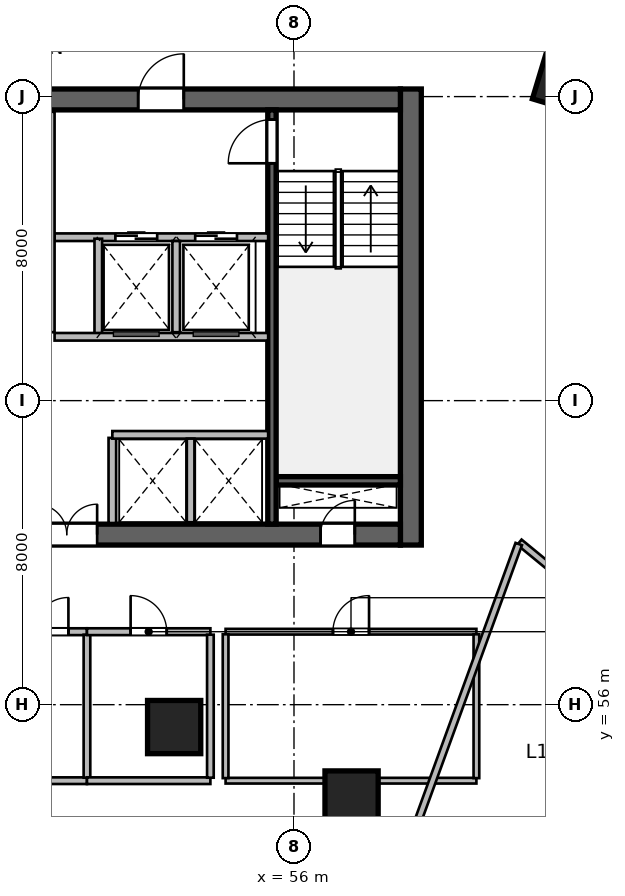
"""IFC4 building model, lengths in metres.
Left out: names, types, materials, properties, quantities, classifications, styles, units other than length and angle.
Written with IfcOpenShell. Run it as: python <this file> out.ifc"""

import sys

from ifc_helpers import new_model, si_unit, direction, frame, frame_2d, origin, origin_2d, place, context, subcontext, project, spatial, rectangle, circle, extrude, source, transform, mapped, element, fill, save


model = new_model("IFC4")
c1 = context("Model", 3, precision=1e-05, world=origin(), true_north=direction((0.0, 1.0)))
c2 = subcontext(c1, "Body", "Model", "MODEL_VIEW")
j1 = project(units=[si_unit("LENGTHUNIT", "METRE"), si_unit("PLANEANGLEUNIT", "RADIAN")], contexts=[c1])
p1 = place(None, origin())
s1 = spatial("IfcSite", under=j1, at=p1, CompositionType="ELEMENT")
p2 = place(p1, origin())
s2 = spatial("IfcBuilding", under=s1, at=p2, CompositionType="ELEMENT")
p3 = place(p2, frame((0.0, 0.0, 57.0)))
s3 = spatial("IfcBuildingStorey", under=s2, at=p3, CompositionType="ELEMENT", Elevation=57.0)
m1 = source(origin(), c2, "Body", "SweptSolid", [
    extrude(rectangle(XDim=12.0, YDim=0.55, at=frame_2d((6.0, 0.0))), origin(), (0.0, 0.0, 1.0), 3.6),
])
p4 = place(p3, frame((59.075, 60.2, 0.0), z_axis=(0.0, 0.0, 1.0), x_axis=(0.0, 1.0, 0.0)))
e1 = element("IfcWall", 1, at=p4, inside=s3, PredefinedType="SHEAR", context=c2, shape_type="MappedRepresentation", body=[
    mapped(m1, transform((0.0, 0.0, 0.0), scale=1.0)),
])
m2 = source(origin(), c2, "Body", "SweptSolid", [
    extrude(rectangle(XDim=21.6, YDim=0.55, at=frame_2d((10.8, 0.0))), origin(), (0.0, 0.0, 1.0), 3.6),
])
p5 = place(p3, frame((37.2, 60.475, 0.0), z_axis=(0.0, 0.0, 1.0), x_axis=(1.0, 0.0, 0.0)))
e2 = element("IfcWall", 2, at=p5, inside=s3, PredefinedType="SHEAR", context=c2, shape_type="MappedRepresentation", body=[
    mapped(m2, transform((0.0, 0.0, 0.0), scale=1.0)),
])
p6 = place(p5, frame((1.1, 0.0, 0.0)))
e3 = element("IfcOpeningElement", 3, at=p6, cuts=e2, PredefinedType="OPENING", context=c2, shape_type="SweptSolid", body=[
    extrude(rectangle(XDim=1.15, YDim=2.15, at=frame_2d((0.575, 1.075))), frame((0.0, 0.285, 0.0), z_axis=(0.0, -1.0, 0.0), x_axis=(1.0, 0.0, 0.0)), (0.0, 0.0, 1.0), 0.57),
])
p7 = place(p5, frame((19.5, 0.0, 0.0)))
e4 = element("IfcOpeningElement", 4, at=p7, cuts=e2, PredefinedType="OPENING", context=c2, shape_type="SweptSolid", body=[
    extrude(rectangle(XDim=0.9, YDim=2.1, at=frame_2d((0.45, 1.05))), frame((0.0, 0.285, 0.0), z_axis=(0.0, -1.0, 0.0), x_axis=(1.0, 0.0, 0.0)), (0.0, 0.0, 1.0), 0.57),
])
p8 = place(p5, frame((12.02, 0.0, 0.0)))
e5 = element("IfcOpeningElement", 5, at=p8, cuts=e2, PredefinedType="OPENING", context=c2, shape_type="SweptSolid", body=[
    extrude(rectangle(XDim=1.6, YDim=2.15, at=frame_2d((0.8, 1.075))), frame((0.0, 0.285, 0.0), z_axis=(0.0, -1.0, 0.0), x_axis=(1.0, 0.0, 0.0)), (0.0, 0.0, 1.0), 0.57),
])
p9 = place(p3, frame((37.2, 71.925, 0.0), z_axis=(0.0, 0.0, 1.0), x_axis=(1.0, 0.0, 0.0)))
e6 = element("IfcWall", 6, at=p9, inside=s3, PredefinedType="SHEAR", context=c2, shape_type="MappedRepresentation", body=[
    mapped(m2, transform((0.0, 0.0, 0.0), scale=1.0)),
])
p10 = place(p9, frame((1.2, 0.0, 0.0)))
e7 = element("IfcOpeningElement", 7, at=p10, cuts=e6, PredefinedType="OPENING", context=c2, shape_type="SweptSolid", body=[
    extrude(rectangle(XDim=0.9, YDim=2.1, at=frame_2d((0.45, 1.05))), frame((0.0, 0.285, 0.0), z_axis=(0.0, -1.0, 0.0), x_axis=(1.0, 0.0, 0.0)), (0.0, 0.0, 1.0), 0.57),
])
p11 = place(p9, frame((14.7, 0.0, 0.0)))
e8 = element("IfcOpeningElement", 8, at=p11, cuts=e6, PredefinedType="OPENING", context=c2, shape_type="SweptSolid", body=[
    extrude(rectangle(XDim=1.2, YDim=2.15, at=frame_2d((0.6, 1.075))), frame((0.0, 0.285, 0.0), z_axis=(0.0, -1.0, 0.0), x_axis=(1.0, 0.0, 0.0)), (0.0, 0.0, 1.0), 0.57),
])
p12 = place(p9, frame((4.15, 0.0, 0.0)))
e9 = element("IfcOpeningElement", 9, at=p12, cuts=e6, PredefinedType="OPENING", context=c2, shape_type="SweptSolid", body=[
    extrude(rectangle(XDim=1.3, YDim=2.15, at=frame_2d((0.65, 1.075))), frame((0.0, 0.285, 0.0), z_axis=(0.0, -1.0, 0.0), x_axis=(1.0, 0.0, 0.0)), (0.0, 0.0, 1.0), 0.57),
])
p13 = place(p9, frame((7.25, 0.0, 0.0)))
e10 = element("IfcOpeningElement", 10, at=p13, cuts=e6, PredefinedType="OPENING", context=c2, shape_type="SweptSolid", body=[
    extrude(rectangle(XDim=0.9, YDim=2.1, at=frame_2d((0.45, 1.05))), frame((0.0, 0.285, 0.0), z_axis=(0.0, -1.0, 0.0), x_axis=(1.0, 0.0, 0.0)), (0.0, 0.0, 1.0), 0.57),
])
m3 = source(origin(), c2, "Body", "SweptSolid", [
    extrude(rectangle(XDim=3.27, YDim=0.22, at=frame_2d((1.635, 0.0))), origin(), (0.0, 0.0, 1.0), 3.6),
])
p14 = place(p3, frame((55.53, 61.89, 0.0), z_axis=(0.0, 0.0, 1.0), x_axis=(1.0, 0.0, 0.0)))
e11 = element("IfcWall", 11, at=p14, inside=s3, PredefinedType="SHEAR", context=c2, shape_type="MappedRepresentation", body=[
    mapped(m3, transform((0.0, 0.0, 0.0), scale=1.0)),
])
m4 = source(origin(), c2, "Body", "SweptSolid", [
    extrude(rectangle(XDim=10.9, YDim=0.22, at=frame_2d((5.45, 0.0))), origin(), (0.0, 0.0, 1.0), 3.6),
])
p15 = place(p3, frame((55.42, 60.75, 0.0), z_axis=(0.0, 0.0, 1.0), x_axis=(0.0, 1.0, 0.0)))
e12 = element("IfcWall", 12, at=p15, inside=s3, PredefinedType="SHEAR", context=c2, shape_type="MappedRepresentation", body=[
    mapped(m4, transform((0.0, 0.0, 0.0), scale=1.0)),
])
p16 = place(p15, frame((9.495, 0.0, 0.0)))
e13 = element("IfcOpeningElement", 13, at=p16, cuts=e12, PredefinedType="OPENING", context=c2, shape_type="SweptSolid", body=[
    extrude(rectangle(XDim=1.15, YDim=2.15, at=frame_2d((0.575, 1.075))), frame((0.0, 0.12, 0.0), z_axis=(0.0, -1.0, 0.0), x_axis=(1.0, 0.0, 0.0)), (0.0, 0.0, 1.0), 0.24),
])
m5 = source(origin(), c2, "Body", "SweptSolid", [
    extrude(circle(Radius=0.7, at=origin_2d()), origin(), (0.0, 0.0, 1.0), 3.6),
])
for number, where, z_axis, x_axis in (
    (14, (52.846, 55.411, 0.0), (0.0, 0.0, 1.0), (0.143, 0.99, 0.0)),
    (15, (57.515, 53.558, 0.0), (0.0, 0.0, 1.0), (0.289, 0.957, 0.0)),
):
    element("IfcColumn", number, at=place(p3, frame(where, z_axis=z_axis, x_axis=x_axis)), inside=s3, PredefinedType="COLUMN", context=c2, shape_type="MappedRepresentation", body=[
        mapped(m5, transform((0.0, 0.0, 0.0), scale=1.0)),
    ])
m6 = source(origin(), c2, "Body", "SweptSolid", [
    extrude(rectangle(XDim=1.5, YDim=1.5, at=origin_2d()), origin(), (0.0, 0.0, 1.0), 3.6),
])
p17 = place(p3, frame((63.209, 72.442, 0.0), z_axis=(0.0, 0.0, 1.0), x_axis=(0.288697611798, 0.957420330337, 0.0)))
e16 = element("IfcColumn", 16, at=p17, inside=s3, PredefinedType="COLUMN", context=c2, shape_type="MappedRepresentation", body=[
    mapped(m6, transform((0.0, 0.0, 0.0), scale=1.0)),
])
m7 = source(origin(), c2, "Body", "SweptSolid", [
    extrude(rectangle(XDim=2.24, YDim=0.2, at=frame_2d((1.12, 0.0))), origin(), (0.0, 0.0, 1.0), 3.36),
])
p18 = place(p3, frame((51.22, 60.78, 0.0), z_axis=(0.0, 0.0, 1.0), x_axis=(0.0, 1.0, 0.0)))
e17 = element("IfcWall", 17, at=p18, inside=s3, PredefinedType="SOLIDWALL", context=c2, shape_type="MappedRepresentation", body=[
    mapped(m7, transform((0.0, 0.0, 0.0), scale=1.0)),
])
m8 = source(origin(), c2, "Body", "SweptSolid", [
    extrude(rectangle(XDim=5.62, YDim=0.2, at=frame_2d((2.81, 0.0))), origin(), (0.0, 0.0, 1.0), 3.36),
])
p19 = place(p3, frame((49.7, 68.3, 0.0), z_axis=(0.0, 0.0, 1.0), x_axis=(1.0, 0.0, 0.0)))
e18 = element("IfcWall", 18, at=p19, inside=s3, PredefinedType="SOLIDWALL", context=c2, shape_type="MappedRepresentation", body=[
    mapped(m8, transform((0.0, 0.0, 0.0), scale=1.0)),
])
p20 = place(p19, frame((1.6, 0.0, 0.0)))
e19 = element("IfcOpeningElement", 19, at=p20, cuts=e18, PredefinedType="OPENING", context=c2, shape_type="SweptSolid", body=[
    extrude(rectangle(XDim=1.1, YDim=2.15, at=frame_2d((0.55, 1.075))), frame((0.0, 0.11, 0.0), z_axis=(0.0, -1.0, 0.0), x_axis=(1.0, 0.0, 0.0)), (0.0, 0.0, 1.0), 0.22),
])
p21 = place(p19, frame((3.7, 0.0, 0.0)))
e20 = element("IfcOpeningElement", 20, at=p21, cuts=e18, PredefinedType="OPENING", context=c2, shape_type="SweptSolid", body=[
    extrude(rectangle(XDim=1.1, YDim=2.15, at=frame_2d((0.55, 1.075))), frame((0.0, 0.11, 0.0), z_axis=(0.0, -1.0, 0.0), x_axis=(1.0, 0.0, 0.0)), (0.0, 0.0, 1.0), 0.22),
])
m9 = source(origin(), c2, "Body", "SweptSolid", [
    extrude(rectangle(XDim=5.8, YDim=0.2, at=frame_2d((2.9, 0.0))), origin(), (0.0, 0.0, 1.0), 3.36),
])
p22 = place(p3, frame((49.6, 65.8, 0.0), z_axis=(0.0, 0.0, 1.0), x_axis=(0.0, 1.0, 0.0)))
e21 = element("IfcWall", 21, at=p22, inside=s3, PredefinedType="SOLIDWALL", context=c2, shape_type="MappedRepresentation", body=[
    mapped(m9, transform((0.0, 0.0, 0.0), scale=1.0)),
])
m10 = source(origin(), c2, "Body", "SweptSolid", [
    extrude(rectangle(XDim=2.58, YDim=0.2, at=frame_2d((1.29, 0.0))), origin(), (0.0, 0.0, 1.0), 3.36),
])
p23 = place(p3, frame((50.85, 65.68, 0.0), z_axis=(0.0, 0.0, 1.0), x_axis=(0.0, 1.0, 0.0)))
e22 = element("IfcWall", 22, at=p23, inside=s3, PredefinedType="SOLIDWALL", context=c2, shape_type="MappedRepresentation", body=[
    mapped(m10, transform((0.0, 0.0, 0.0), scale=1.0)),
])
m11 = source(origin(), c2, "Body", "SweptSolid", [
    extrude(rectangle(XDim=2.4, YDim=0.2, at=frame_2d((1.2, 0.0))), origin(), (0.0, 0.0, 1.0), 3.36),
])
p24 = place(p3, frame((52.9, 65.8, 0.0), z_axis=(0.0, 0.0, 1.0), x_axis=(0.0, 1.0, 0.0)))
e23 = element("IfcWall", 23, at=p24, inside=s3, PredefinedType="SOLIDWALL", context=c2, shape_type="MappedRepresentation", body=[
    mapped(m11, transform((0.0, 0.0, 0.0), scale=1.0)),
])
p25 = place(p3, frame((49.7, 65.68, 0.0), z_axis=(0.0, 0.0, 1.0), x_axis=(1.0, 0.0, 0.0)))
e24 = element("IfcWall", 24, at=p25, inside=s3, PredefinedType="SOLIDWALL", context=c2, shape_type="MappedRepresentation", body=[
    mapped(m8, transform((0.0, 0.0, 0.0), scale=1.0)),
])
m12 = source(origin(), c2, "Body", "SweptSolid", [
    extrude(rectangle(XDim=4.1, YDim=0.2, at=frame_2d((2.05, 0.0))), origin(), (0.0, 0.0, 1.0), 3.36),
])
p26 = place(p3, frame((51.22, 63.1, 0.0), z_axis=(0.0, 0.0, 1.0), x_axis=(1.0, 0.0, 0.0)))
e25 = element("IfcWall", 25, at=p26, inside=s3, PredefinedType="SOLIDWALL", context=c2, shape_type="MappedRepresentation", body=[
    mapped(m12, transform((0.0, 0.0, 0.0), scale=1.0)),
])
m13 = source(origin(), c2, "Body", "SweptSolid", [
    extrude(rectangle(XDim=2.2, YDim=0.2, at=frame_2d((1.1, 0.0))), origin(), (0.0, 0.0, 1.0), 3.36),
])
p27 = place(p3, frame((53.28, 60.8, 0.0), z_axis=(0.0, 0.0, 1.0), x_axis=(0.0, 1.0, 0.0)))
e26 = element("IfcWall", 26, at=p27, inside=s3, PredefinedType="SOLIDWALL", context=c2, shape_type="MappedRepresentation", body=[
    mapped(m13, transform((0.0, 0.0, 0.0), scale=1.0)),
])
m14 = source(origin(), c2, "Body", "SweptSolid", [
    extrude(rectangle(XDim=4.176, YDim=0.175, at=frame_2d((2.088, 0.0))), origin(), (0.0, 0.0, 1.0), 3.36),
])
p28 = place(p3, frame((46.376, 54.0, 0.0), z_axis=(0.0, 0.0, 1.0), x_axis=(1.0, 0.0, 0.0)))
e27 = element("IfcWall", 27, at=p28, inside=s3, PredefinedType="PARTITIONING", context=c2, shape_type="MappedRepresentation", body=[
    mapped(m14, transform((0.0, 0.0, 0.0), scale=1.0)),
])
m15 = source(origin(), c2, "Body", "SweptSolid", [
    extrude(rectangle(XDim=4.176, YDim=0.18, at=frame_2d((2.088, 0.0))), origin(), (0.0, 0.0, 1.0), 3.36),
])
p29 = place(p3, frame((46.376, 57.92, 0.0), z_axis=(0.0, 0.0, 1.0), x_axis=(1.0, 0.0, 0.0)))
e28 = element("IfcWall", 28, at=p29, inside=s3, PredefinedType="PLUMBINGWALL", context=c2, shape_type="MappedRepresentation", body=[
    mapped(m15, transform((0.0, 0.0, 0.0), scale=1.0)),
])
p30 = place(p29, frame((2.788, 0.0, 0.0)))
e29 = element("IfcOpeningElement", 29, at=p30, cuts=e28, PredefinedType="OPENING", context=c2, shape_type="SweptSolid", body=[
    extrude(rectangle(XDim=0.9, YDim=2.08, at=frame_2d((0.45, 1.04))), frame((0.0, 0.1, 0.0), z_axis=(0.0, -1.0, 0.0), x_axis=(1.0, 0.0, 0.0)), (0.0, 0.0, 1.0), 0.2),
])
m16 = source(origin(), c2, "Body", "SweptSolid", [
    extrude(rectangle(XDim=3.763, YDim=0.175, at=frame_2d((1.881, 0.0))), origin(), (0.0, 0.0, 1.0), 3.36),
])
p31 = place(p3, frame((50.552, 54.079, 0.0), z_axis=(0.0, 0.0, 1.0), x_axis=(0.0, 1.0, 0.0)))
e30 = element("IfcWall", 30, at=p31, inside=s3, PredefinedType="PARTITIONING", context=c2, shape_type="MappedRepresentation", body=[
    mapped(m16, transform((0.0, 0.0, 0.0), scale=1.0)),
])
m17 = source(origin(), c2, "Body", "SweptSolid", [
    extrude(rectangle(XDim=3.248, YDim=0.175, at=frame_2d((1.624, 0.0))), origin(), (0.0, 0.0, 1.0), 3.36),
])
p32 = place(p3, frame((50.552, 54.0, 0.0), z_axis=(0.0, 0.0, 1.0), x_axis=(1.0, 0.0, 0.0)))
e31 = element("IfcWall", 31, at=p32, inside=s3, PredefinedType="PARTITIONING", context=c2, shape_type="MappedRepresentation", body=[
    mapped(m17, transform((0.0, 0.0, 0.0), scale=1.0)),
])
m18 = source(origin(), c2, "Body", "SweptSolid", [
    extrude(rectangle(XDim=3.248, YDim=0.18, at=frame_2d((1.624, 0.0))), origin(), (0.0, 0.0, 1.0), 3.36),
])
p33 = place(p3, frame((50.552, 57.92, 0.0), z_axis=(0.0, 0.0, 1.0), x_axis=(1.0, 0.0, 0.0)))
e32 = element("IfcWall", 32, at=p33, inside=s3, PredefinedType="PLUMBINGWALL", context=c2, shape_type="MappedRepresentation", body=[
    mapped(m18, transform((0.0, 0.0, 0.0), scale=1.0)),
])
p34 = place(p33, frame((1.149, 0.0, 0.0)))
e33 = element("IfcOpeningElement", 33, at=p34, cuts=e32, PredefinedType="OPENING", context=c2, shape_type="SweptSolid", body=[
    extrude(rectangle(XDim=0.95, YDim=2.12, at=frame_2d((0.475, 1.06))), frame((0.0, 0.1, 0.0), z_axis=(0.0, -1.0, 0.0), x_axis=(1.0, 0.0, 0.0)), (0.0, 0.0, 1.0), 0.2),
])
p35 = place(p3, frame((53.8, 54.079, 0.0), z_axis=(0.0, 0.0, 1.0), x_axis=(0.0, 1.0, 0.0)))
e34 = element("IfcWall", 34, at=p35, inside=s3, PredefinedType="PARTITIONING", context=c2, shape_type="MappedRepresentation", body=[
    mapped(m16, transform((0.0, 0.0, 0.0), scale=1.0)),
])
m19 = source(origin(), c2, "Body", "SweptSolid", [
    extrude(rectangle(XDim=6.6, YDim=0.15, at=frame_2d((3.3, 0.0))), origin(), (0.0, 0.0, 1.0), 2.803),
])
p36 = place(p3, frame((54.2, 54.0, 0.0), z_axis=(0.0, 0.0, 1.0), x_axis=(1.0, 0.0, 0.0)))
e35 = element("IfcWall", 35, at=p36, inside=s3, PredefinedType="PARTITIONING", context=c2, shape_type="MappedRepresentation", body=[
    mapped(m19, transform((0.0, 0.0, 0.0), scale=1.0)),
])
m20 = source(origin(), c2, "Body", "SweptSolid", [
    extrude(rectangle(XDim=6.6, YDim=0.15, at=frame_2d((3.3, 0.0))), origin(), (0.0, 0.0, 1.0), 3.36),
])
p37 = place(p3, frame((54.2, 57.92, 0.0), z_axis=(0.0, 0.0, 1.0), x_axis=(1.0, 0.0, 0.0)))
e36 = element("IfcWall", 36, at=p37, inside=s3, PredefinedType="PARTITIONING", context=c2, shape_type="MappedRepresentation", body=[
    mapped(m20, transform((0.0, 0.0, 0.0), scale=1.0)),
])
p38 = place(p37, frame((2.825, 0.0, 0.0)))
e37 = element("IfcOpeningElement", 37, at=p38, cuts=e36, PredefinedType="OPENING", context=c2, shape_type="SweptSolid", body=[
    extrude(rectangle(XDim=0.95, YDim=2.1, at=frame_2d((0.475, 1.05))), frame((0.0, 0.085, 0.0), z_axis=(0.0, -1.0, 0.0), x_axis=(1.0, 0.0, 0.0)), (0.0, 0.0, 1.0), 0.17),
])
m21 = source(origin(), c2, "Body", "SweptSolid", [
    extrude(rectangle(XDim=3.785, YDim=0.15, at=frame_2d((1.893, 0.0))), origin(), (0.0, 0.0, 1.0), 3.36),
])
for number, where, z_axis, x_axis in (
    (38, (54.2, 54.067, 0.0), (0.0, 0.0, 1.0), (0.0, 1.0, 0.0)),
    (39, (60.8, 54.067, 0.0), (0.0, 0.0, 1.0), (0.0, 1.0, 0.0)),
):
    element("IfcWall", number, at=place(p3, frame(where, z_axis=z_axis, x_axis=x_axis)), inside=s3, PredefinedType="PARTITIONING", context=c2, shape_type="MappedRepresentation", body=[
        mapped(m21, transform((0.0, 0.0, 0.0), scale=1.0)),
    ])
m22 = source(origin(), c2, "Body", "SweptSolid", [
    extrude(rectangle(XDim=6.721, YDim=0.18, at=frame_2d((3.361, 0.0))), origin(), (0.0, 0.0, 1.0), 3.36),
])
p39 = place(p3, frame((61.931, 60.275, 0.0), z_axis=(0.0, 0.0, 1.0), x_axis=(0.772828051199, -0.63461547671, 0.0)))
e40 = element("IfcWall", 40, at=p39, inside=s3, PredefinedType="PLUMBINGWALL", context=c2, shape_type="MappedRepresentation", body=[
    mapped(m22, transform((0.0, 0.0, 0.0), scale=1.0)),
])
p40 = place(p39, frame((2.885, 0.0, 0.0)))
e41 = element("IfcOpeningElement", 41, at=p40, cuts=e40, PredefinedType="OPENING", context=c2, shape_type="SweptSolid", body=[
    extrude(rectangle(XDim=0.95, YDim=2.15, at=frame_2d((0.475, 1.075))), frame((0.0, 0.1, 0.0), z_axis=(0.0, -1.0, 0.0), x_axis=(1.0, 0.0, 0.0)), (0.0, 0.0, 1.0), 0.2),
])
m23 = source(origin(), c2, "Body", "SweptSolid", [
    extrude(rectangle(XDim=12.196, YDim=0.18, at=frame_2d((6.098, 0.0))), origin(), (0.0, 0.0, 1.0), 3.36),
])
p41 = place(p3, frame((57.742, 48.766, 0.0), z_axis=(0.0, 0.0, 1.0), x_axis=(0.342022711534, 0.939691686031, 0.0)))
e42 = element("IfcWall", 42, at=p41, inside=s3, PredefinedType="PLUMBINGWALL", context=c2, shape_type="MappedRepresentation", body=[
    mapped(m23, transform((0.0, 0.0, 0.0), scale=1.0)),
])
m24 = source(origin(), c2, "Body", "SweptSolid", [
    extrude(rectangle(XDim=11.67, YDim=0.18, at=frame_2d((5.835, 0.0))), origin(), (0.0, 0.0, 1.0), 3.36),
])
p42 = place(p3, frame((61.381, 45.795, 0.0), z_axis=(0.0, 0.0, 1.0), x_axis=(0.490156946222, 0.871634193954, 0.0)))
e43 = element("IfcWall", 43, at=p42, inside=s3, PredefinedType="PLUMBINGWALL", context=c2, shape_type="MappedRepresentation", body=[
    mapped(m24, transform((0.0, 0.0, 0.0), scale=1.0)),
])
m25 = source(origin(), c2, "Body", "SweptSolid", [
    extrude(rectangle(XDim=0.9, YDim=2.1, at=frame_2d((0.45, 1.05))), frame((0.0, 0.025, 0.0), z_axis=(0.0, -1.0, 0.0), x_axis=(1.0, 0.0, 0.0)), (0.0, 0.0, 1.0), 0.05),
])
p43 = place(p7, origin())
e44 = element("IfcDoor", 44, at=p43, inside=s3, OperationType="SINGLE_SWING_RIGHT", PredefinedType="DOOR", context=c2, shape_type="MappedRepresentation", body=[
    mapped(m25, transform((0.0, 0.0, 0.0), scale=1.0)),
])
fill(e4, e44)
m26 = source(origin(), c2, "Body", "SweptSolid", [
    extrude(rectangle(XDim=1.15, YDim=2.15, at=frame_2d((0.575, 1.075))), frame((0.0, 0.025, 0.0), z_axis=(0.0, -1.0, 0.0), x_axis=(1.0, 0.0, 0.0)), (0.0, 0.0, 1.0), 0.05),
])
p44 = place(p16, origin())
e45 = element("IfcDoor", 45, at=p44, inside=s3, OperationType="SINGLE_SWING_LEFT", PredefinedType="DOOR", context=c2, shape_type="MappedRepresentation", body=[
    mapped(m26, transform((0.0, 0.0, 0.0), scale=1.0)),
])
fill(e13, e45)
m27 = source(origin(), c2, "Body", "SweptSolid", [
    extrude(rectangle(XDim=1.6, YDim=2.15, at=frame_2d((0.8, 1.075))), frame((0.0, 0.025, 0.0), z_axis=(0.0, -1.0, 0.0), x_axis=(1.0, 0.0, 0.0)), (0.0, 0.0, 1.0), 0.05),
])
p45 = place(p8, origin())
e46 = element("IfcDoor", 46, at=p45, inside=s3, OperationType="DOUBLE_DOOR_SINGLE_SWING", PredefinedType="DOOR", context=c2, shape_type="MappedRepresentation", body=[
    mapped(m27, transform((0.0, 0.0, 0.0), scale=1.0)),
])
fill(e5, e46)
m28 = source(origin(), c2, "Body", "SweptSolid", [
    extrude(rectangle(XDim=1.2, YDim=2.15, at=frame_2d((0.6, 1.075))), frame((0.0, 0.025, 0.0), z_axis=(0.0, -1.0, 0.0), x_axis=(1.0, 0.0, 0.0)), (0.0, 0.0, 1.0), 0.05),
])
p46 = place(p11, origin())
e47 = element("IfcDoor", 47, at=p46, inside=s3, OperationType="SINGLE_SWING_RIGHT", PredefinedType="DOOR", context=c2, shape_type="MappedRepresentation", body=[
    mapped(m28, transform((0.0, 0.0, 0.0), scale=1.0)),
])
fill(e8, e47)
m29 = source(origin(), c2, "Body", "SweptSolid", [
    extrude(rectangle(XDim=1.1, YDim=2.15, at=frame_2d((0.55, 1.075))), frame((0.0, 0.025, 0.0), z_axis=(0.0, -1.0, 0.0), x_axis=(1.0, 0.0, 0.0)), (0.0, 0.0, 1.0), 0.05),
])
p47 = place(p20, origin())
e48 = element("IfcDoor", 48, at=p47, inside=s3, OperationType="DOUBLE_DOOR_SLIDING", PredefinedType="DOOR", context=c2, shape_type="MappedRepresentation", body=[
    mapped(m29, transform((0.0, 0.0, 0.0), scale=1.0)),
])
fill(e19, e48)
p48 = place(p21, origin())
e49 = element("IfcDoor", 49, at=p48, inside=s3, OperationType="DOUBLE_DOOR_SLIDING", PredefinedType="DOOR", context=c2, shape_type="MappedRepresentation", body=[
    mapped(m29, transform((0.0, 0.0, 0.0), scale=1.0)),
])
fill(e20, e49)
m30 = source(origin(), c2, "Body", "SweptSolid", [
    extrude(rectangle(XDim=0.9, YDim=2.08, at=frame_2d((0.45, 1.04))), frame((0.0, 0.025, 0.0), z_axis=(0.0, -1.0, 0.0), x_axis=(1.0, 0.0, 0.0)), (0.0, 0.0, 1.0), 0.05),
])
p49 = place(p30, origin())
e50 = element("IfcDoor", 50, at=p49, inside=s3, OperationType="SINGLE_SWING_RIGHT", PredefinedType="DOOR", context=c2, shape_type="MappedRepresentation", body=[
    mapped(m30, transform((0.0, 0.0, 0.0), scale=1.0)),
])
fill(e29, e50)
m31 = source(origin(), c2, "Body", "SweptSolid", [
    extrude(rectangle(XDim=0.95, YDim=2.12, at=frame_2d((0.475, 1.06))), frame((0.0, 0.025, 0.0), z_axis=(0.0, -1.0, 0.0), x_axis=(1.0, 0.0, 0.0)), (0.0, 0.0, 1.0), 0.05),
])
p50 = place(p34, origin())
e51 = element("IfcDoor", 51, at=p50, inside=s3, OperationType="SINGLE_SWING_LEFT", PredefinedType="DOOR", context=c2, shape_type="MappedRepresentation", body=[
    mapped(m31, transform((0.0, 0.0, 0.0), scale=1.0)),
])
fill(e33, e51)
m32 = source(origin(), c2, "Body", "SweptSolid", [
    extrude(rectangle(XDim=0.95, YDim=2.1, at=frame_2d((0.475, 1.05))), frame((0.0, 0.025, 0.0), z_axis=(0.0, -1.0, 0.0), x_axis=(1.0, 0.0, 0.0)), (0.0, 0.0, 1.0), 0.05),
])
p51 = place(p38, origin())
e52 = element("IfcDoor", 52, at=p51, inside=s3, OperationType="SINGLE_SWING_RIGHT", PredefinedType="DOOR", context=c2, shape_type="MappedRepresentation", body=[
    mapped(m32, transform((0.0, 0.0, 0.0), scale=1.0)),
])
fill(e37, e52)
save(model, sys.argv[1])
